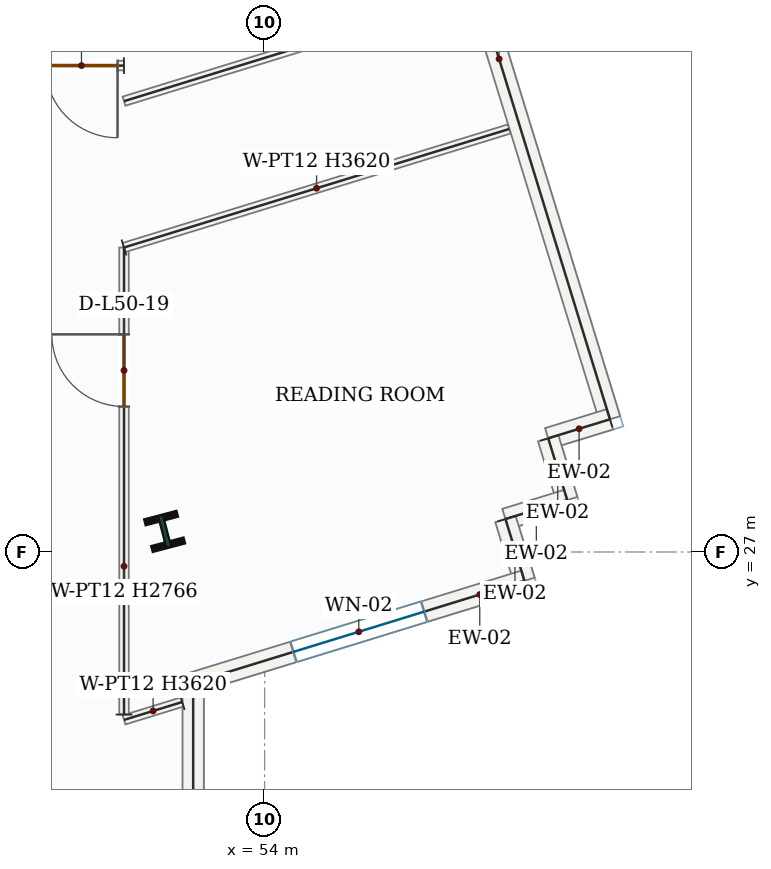
"""IFC4 building model, lengths in metres.
Left out: names, types, materials, properties, quantities, classifications, styles, units other than length and angle.
Written with IfcOpenShell. Run it as: python <this file> out.ifc"""

import sys

from ifc_helpers import new_model, si_unit, direction, frame, frame_2d, origin, origin_2d, place, context, subcontext, project, spatial, rectangle, i_section, extrude, source, transform, mapped, element, fill, save


model = new_model("IFC4")
c1 = context("Model", 3, precision=1e-05, world=origin(), true_north=direction((0.0, 1.0)))
c2 = subcontext(c1, "Body", "Model", "MODEL_VIEW")
j1 = project(units=[si_unit("LENGTHUNIT", "METRE"), si_unit("PLANEANGLEUNIT", "RADIAN")], contexts=[c1])
p1 = place(None, origin())
s1 = spatial("IfcSite", under=j1, at=p1, CompositionType="ELEMENT")
p2 = place(p1, origin())
s2 = spatial("IfcBuilding", under=s1, at=p2, CompositionType="ELEMENT")
p3 = place(p2, frame((0.0, 0.0, 213.6)))
s3 = spatial("IfcBuildingStorey", under=s2, at=p3, CompositionType="ELEMENT", Elevation=213.6)
m1 = source(origin(), c2, "Body", "SweptSolid", [
    extrude(i_section(OverallWidth=0.404, OverallDepth=0.407, WebThickness=0.027, FlangeThickness=0.044, FilletRadius=0.018, at=origin_2d()), origin(), (0.0, 0.0, 1.0), 3.9),
])
p4 = place(p3, frame((52.684, 27.271, 0.0), z_axis=(0.0, 0.0, 1.0), x_axis=(0.966823388604, 0.255445757936, 0.0)))
e1 = element("IfcColumn", 1, at=p4, inside=s3, PredefinedType="COLUMN", context=c2, shape_type="MappedRepresentation", body=[
    mapped(m1, transform((0.0, 0.0, 0.0), x_axis=(1.0, 0.0, 0.0), y_axis=(0.0, 1.0, 0.0), z_axis=(0.0, 0.0, 1.0), scale=1.0)),
])
m2 = source(origin(), c2, "Body", "SweptSolid", [
    extrude(rectangle(XDim=9.92, YDim=0.28, at=frame_2d((4.96, 0.0))), origin(), (0.0, 0.0, 1.0), 3.62),
])
p5 = place(p3, frame((55.626, 38.227, 0.0), z_axis=(0.0, 0.0, 1.0), x_axis=(0.294028777175, -0.955796567368, 0.0)))
e2 = element("IfcWall", 2, at=p5, inside=s3, PredefinedType="SOLIDWALL", context=c2, shape_type="MappedRepresentation", body=[
    mapped(m2, transform((0.0, 0.0, 0.0), x_axis=(1.0, 0.0, 0.0), y_axis=(0.0, 1.0, 0.0), z_axis=(0.0, 0.0, 1.0), scale=1.0)),
])
m3 = source(origin(), c2, "Body", "SweptSolid", [
    extrude(rectangle(XDim=0.85, YDim=0.28, at=frame_2d((0.425, 0.0))), origin(), (0.0, 0.0, 1.0), 3.62),
])
p6 = place(p3, frame((58.543, 28.746, 0.0), z_axis=(0.0, 0.0, 1.0), x_axis=(-0.955779008722, -0.294085848838, 0.0)))
e3 = element("IfcWall", 3, at=p6, inside=s3, PredefinedType="SOLIDWALL", context=c2, shape_type="MappedRepresentation", body=[
    mapped(m3, transform((0.0, 0.0, 0.0), x_axis=(1.0, 0.0, 0.0), y_axis=(0.0, 1.0, 0.0), z_axis=(0.0, 0.0, 1.0), scale=1.0)),
])
m4 = source(origin(), c2, "Body", "SweptSolid", [
    extrude(rectangle(XDim=0.85, YDim=0.28, at=frame_2d((0.425, 0.0))), origin(), (0.0, 0.0, 1.0), 3.62),
])
p7 = place(p3, frame((57.731, 28.496, 0.0), z_axis=(0.0, 0.0, 1.0), x_axis=(0.294166594531, -0.95575416016, 0.0)))
e4 = element("IfcWall", 4, at=p7, inside=s3, PredefinedType="SOLIDWALL", context=c2, shape_type="MappedRepresentation", body=[
    mapped(m4, transform((0.0, 0.0, 0.0), x_axis=(1.0, 0.0, 0.0), y_axis=(0.0, 1.0, 0.0), z_axis=(0.0, 0.0, 1.0), scale=1.0)),
])
for number, where, z_axis, x_axis in (
    (5, (57.981, 27.684, 0.0), (0.0, 0.0, 1.0), (-0.956, -0.294, 0.0)),
    (6, (57.168, 27.434, 0.0), (0.0, 0.0, 1.0), (0.294, -0.956, 0.0)),
):
    element("IfcWall", number, at=place(p3, frame(where, z_axis=z_axis, x_axis=x_axis)), inside=s3, PredefinedType="SOLIDWALL", context=c2, shape_type="MappedRepresentation", body=[
        mapped(m3, transform((0.0, 0.0, 0.0), x_axis=(1.0, 0.0, 0.0), y_axis=(0.0, 1.0, 0.0), z_axis=(0.0, 0.0, 1.0), scale=1.0)),
    ])
p8 = place(p3, frame((57.418, 26.621, 0.0), z_axis=(0.0, 0.0, 1.0), x_axis=(-0.955788269664, -0.294055749089, 0.0)))
e7 = element("IfcWall", 7, at=p8, inside=s3, PredefinedType="SOLIDWALL", context=c2, shape_type="SweptSolid", body=[
    extrude(rectangle(XDim=4.56, YDim=0.28, at=frame_2d((2.28, 0.0))), origin(), (0.0, 0.0, 1.0), 3.62),
])
p9 = place(p8, frame((1.38, 0.0, 0.85)))
e8 = element("IfcOpeningElement", 8, at=p9, cuts=e7, PredefinedType="OPENING", context=c2, shape_type="SweptSolid", body=[
    extrude(rectangle(XDim=1.8, YDim=1.75, at=frame_2d((0.9, 0.875))), frame((0.0, 0.15, 0.0), z_axis=(0.0, -1.0, 0.0), x_axis=(1.0, 0.0, 0.0)), (0.0, 0.0, 1.0), 0.3),
])
m5 = source(origin(), c2, "Body", "SweptSolid", [
    extrude(rectangle(XDim=6.822, YDim=0.28, at=frame_2d((3.411, 0.0))), origin(), (0.0, 0.0, 1.0), 3.62),
])
p10 = place(p3, frame((53.06, 25.28, 0.0), z_axis=(0.0, 0.0, 1.0), x_axis=(0.0, -1.0, 0.0)))
e9 = element("IfcWall", 9, at=p10, inside=s3, PredefinedType="SOLIDWALL", context=c2, shape_type="MappedRepresentation", body=[
    mapped(m5, transform((0.0, 0.0, 0.0), x_axis=(1.0, 0.0, 0.0), y_axis=(0.0, 1.0, 0.0), z_axis=(0.0, 0.0, 1.0), scale=1.0)),
])
m6 = source(origin(), c2, "Body", "SweptSolid", [
    extrude(rectangle(XDim=0.801, YDim=0.125, at=frame_2d((0.4, 0.0))), origin(), (0.0, 0.0, 1.0), 3.62),
])
p11 = place(p3, frame((52.915, 25.026, 0.0), z_axis=(0.0, 0.0, 1.0), x_axis=(-0.955805381473, -0.29400012372, 0.0)))
e10 = element("IfcWall", 10, at=p11, inside=s3, PredefinedType="PARTITIONING", context=c2, shape_type="MappedRepresentation", body=[
    mapped(m6, transform((0.0, 0.0, 0.0), x_axis=(1.0, 0.0, 0.0), y_axis=(0.0, 1.0, 0.0), z_axis=(0.0, 0.0, 1.0), scale=1.0)),
])
p12 = place(p3, frame((52.15, 24.862, 0.0), z_axis=(0.0, 0.0, 1.0), x_axis=(0.0, 1.0, 0.0)))
e11 = element("IfcWall", 11, at=p12, inside=s3, PredefinedType="PARTITIONING", context=c2, shape_type="SweptSolid", body=[
    extrude(rectangle(XDim=6.144, YDim=0.125, at=frame_2d((3.072, 0.0))), origin(), (0.0, 0.0, 1.0), 2.766),
])
p13 = place(p12, frame((4.052, 0.0, 0.0)))
e12 = element("IfcOpeningElement", 12, at=p13, cuts=e11, PredefinedType="OPENING", context=c2, shape_type="SweptSolid", body=[
    extrude(rectangle(XDim=0.95, YDim=2.15, at=frame_2d((0.475, 1.075))), frame((0.0, 0.073, 0.0), z_axis=(0.0, -1.0, 0.0), x_axis=(1.0, 0.0, 0.0)), (0.0, 0.0, 1.0), 0.145),
])
m7 = source(origin(), c2, "Body", "SweptSolid", [
    extrude(rectangle(XDim=5.301, YDim=0.125, at=frame_2d((2.651, 0.0))), origin(), (0.0, 0.0, 1.0), 3.62),
])
p14 = place(p3, frame((52.15, 31.006, 0.0), z_axis=(0.0, 0.0, 1.0), x_axis=(0.955789961274, 0.294050250686, 0.0)))
e13 = element("IfcWall", 13, at=p14, inside=s3, PredefinedType="PARTITIONING", context=c2, shape_type="MappedRepresentation", body=[
    mapped(m7, transform((0.0, 0.0, 0.0), x_axis=(1.0, 0.0, 0.0), y_axis=(0.0, 1.0, 0.0), z_axis=(0.0, 0.0, 1.0), scale=1.0)),
])
m8 = source(origin(), c2, "Body", "SweptSolid", [
    extrude(rectangle(XDim=4.735, YDim=0.125, at=frame_2d((2.368, 0.0))), origin(), (0.0, 0.0, 1.0), 3.62),
])
p15 = place(p3, frame((56.676, 34.323, 0.0), z_axis=(0.0, 0.0, 1.0), x_axis=(-0.955793499711, -0.294038748994, 0.0)))
e14 = element("IfcWall", 14, at=p15, inside=s3, PredefinedType="PARTITIONING", context=c2, shape_type="MappedRepresentation", body=[
    mapped(m8, transform((0.0, 0.0, 0.0), x_axis=(1.0, 0.0, 0.0), y_axis=(0.0, 1.0, 0.0), z_axis=(0.0, 0.0, 1.0), scale=1.0)),
])
p16 = place(p3, frame((52.149, 33.399, 0.0), z_axis=(0.0, 0.0, 1.0), x_axis=(-0.999999754632, 0.000700525222, 0.0)))
e15 = element("IfcWall", 15, at=p16, inside=s3, PredefinedType="PARTITIONING", context=c2, shape_type="SweptSolid", body=[
    extrude(rectangle(XDim=1.394, YDim=0.125, at=frame_2d((0.697, 0.0))), origin(), (0.0, 0.0, 1.0), 3.62),
])
p17 = place(p16, frame((0.084, 0.0, 0.0)))
e16 = element("IfcOpeningElement", 16, at=p17, cuts=e15, PredefinedType="OPENING", context=c2, shape_type="SweptSolid", body=[
    extrude(rectangle(XDim=0.95, YDim=2.15, at=frame_2d((0.475, 1.075))), frame((0.0, 0.073, 0.0), z_axis=(0.0, -1.0, 0.0), x_axis=(1.0, 0.0, 0.0)), (0.0, 0.0, 1.0), 0.145),
])
m9 = source(origin(), c2, "Body", "SweptSolid", [
    extrude(rectangle(XDim=1.8, YDim=1.75, at=frame_2d((0.9, 0.875))), frame((0.0, 0.03, 0.0), z_axis=(0.0, -1.0, 0.0), x_axis=(1.0, 0.0, 0.0)), (0.0, 0.0, 1.0), 0.06),
])
p18 = place(p9, origin())
e17 = element("IfcWindow", 17, at=p18, inside=s3, PartitioningType="DOUBLE_PANEL_VERTICAL", PredefinedType="WINDOW", context=c2, shape_type="MappedRepresentation", body=[
    mapped(m9, transform((0.0, 0.0, 0.0), x_axis=(1.0, 0.0, 0.0), y_axis=(0.0, 1.0, 0.0), z_axis=(0.0, 0.0, 1.0), scale=1.0)),
])
fill(e8, e17)
m10 = source(origin(), c2, "Body", "SweptSolid", [
    extrude(rectangle(XDim=0.95, YDim=2.15, at=frame_2d((0.475, 1.075))), frame((0.0, 0.025, 0.0), z_axis=(0.0, -1.0, 0.0), x_axis=(1.0, 0.0, 0.0)), (0.0, 0.0, 1.0), 0.05),
])
p19 = place(p13, origin())
e18 = element("IfcDoor", 18, at=p19, inside=s3, OperationType="SINGLE_SWING_RIGHT", PredefinedType="DOOR", context=c2, shape_type="MappedRepresentation", body=[
    mapped(m10, transform((0.0, 0.0, 0.0), x_axis=(1.0, 0.0, 0.0), y_axis=(0.0, 1.0, 0.0), z_axis=(0.0, 0.0, 1.0), scale=1.0)),
])
fill(e12, e18)
p20 = place(p17, origin())
e19 = element("IfcDoor", 19, at=p20, inside=s3, OperationType="SINGLE_SWING_LEFT", PredefinedType="DOOR", context=c2, shape_type="MappedRepresentation", body=[
    mapped(m10, transform((0.0, 0.0, 0.0), x_axis=(1.0, 0.0, 0.0), y_axis=(0.0, 1.0, 0.0), z_axis=(0.0, 0.0, 1.0), scale=1.0)),
])
fill(e16, e19)
save(model, sys.argv[1])
